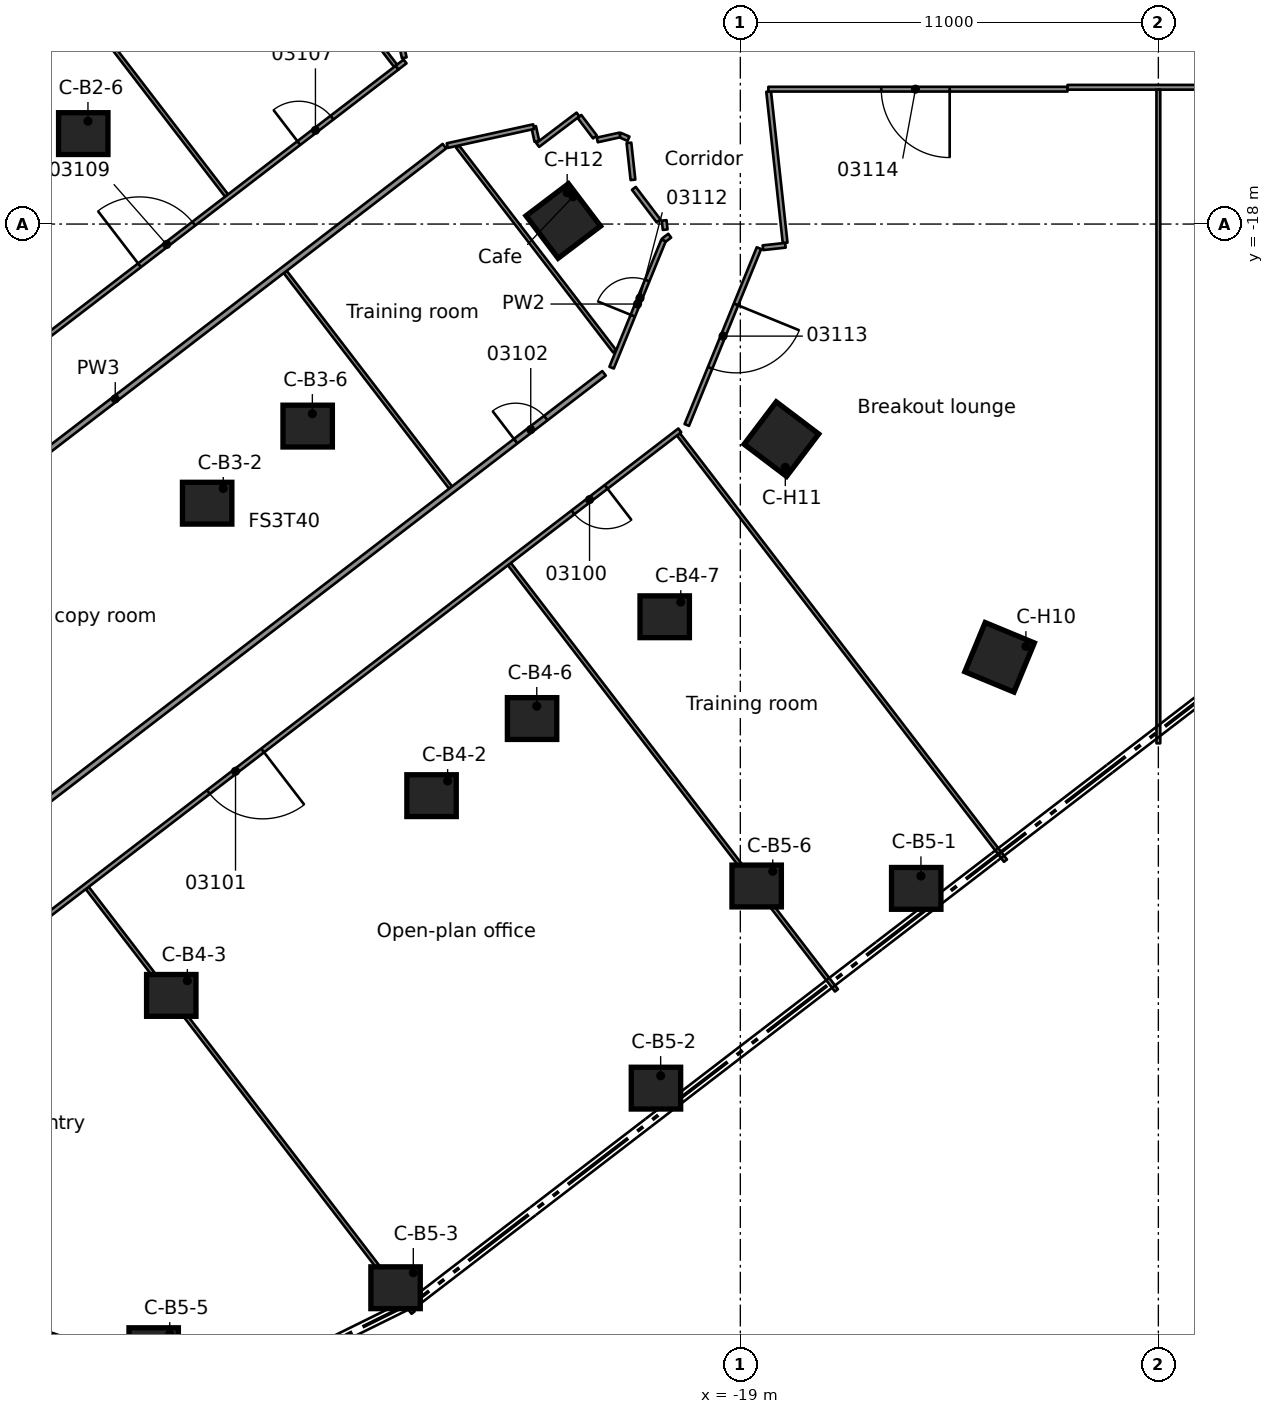
"""IFC4 building model, lengths in metres.
Left out: names, types, materials, properties, quantities, classifications, styles, units other than length and angle.
Written with IfcOpenShell. Run it as: python <this file> out.ifc"""

import sys

from ifc_helpers import new_model, si_unit, direction, frame, frame_2d, origin, origin_2d, place, context, subcontext, project, spatial, rectangle, extrude, element, fill, save


model = new_model("IFC4")
c1 = context("Model", 3, precision=1e-05, world=origin(), true_north=direction((0.0, 1.0)))
c2 = subcontext(c1, "Body", "Model", "MODEL_VIEW")
j1 = project(units=[si_unit("LENGTHUNIT", "METRE"), si_unit("PLANEANGLEUNIT", "RADIAN")], contexts=[c1])
p1 = place(None, origin())
s1 = spatial("IfcSite", under=j1, at=p1, CompositionType="ELEMENT")
p2 = place(p1, origin())
s2 = spatial("IfcBuilding", under=s1, at=p2, CompositionType="ELEMENT")
p3 = place(p2, frame((0.0, 0.0, 15.5)))
s3 = spatial("IfcBuildingStorey", under=s2, at=p3, CompositionType="ELEMENT", Elevation=15.5)
for number, where, z_axis, x_axis in (
    (1, (-36.29, -15.62, 0.0), (0.0, 0.0, 1.0), (1.0, 0.0, 0.0)),
    (2, (-33.03, -25.345, 0.0), (0.0, 0.0, 1.0), (1.0, 0.0, 0.0)),
    (3, (-30.385, -23.316, 0.0), (0.0, 0.0, 1.0), (1.0, 0.0, 0.0)),
    (4, (-27.125, -33.04, 0.0), (0.0, 0.0, 1.0), (1.0, 0.0, 0.0)),
    (5, (-33.974, -38.296, 0.0), (0.0, 0.0, 1.0), (1.0, 0.0, 0.0)),
    (6, (-24.48, -31.011, 0.0), (0.0, 0.0, 1.0), (1.0, 0.0, 0.0)),
    (7, (-20.99, -28.333, 0.0), (0.0, 0.0, 1.0), (1.0, 0.0, 0.0)),
    (8, (-14.371, -35.48, 0.0), (0.0, 0.0, 1.0), (1.0, 0.0, 0.0)),
    (9, (-21.22, -40.736, 0.0), (0.0, 0.0, 1.0), (1.0, 0.0, 0.0)),
    (10, (-28.072, -45.988, 0.0), (0.0, 0.0, 1.0), (1.0, 0.0, 0.0)),
    (11, (-34.437, -47.592, 0.0), (0.0, 0.0, 1.0), (1.0, 0.0, 0.0)),
    (12, (-18.57, -35.417, 0.0), (0.0, 0.0, 1.0), (1.0, 0.0, 0.0)),
):
    element("IfcColumn", number, at=place(p3, frame(where, z_axis=z_axis, x_axis=x_axis)), inside=s3, PredefinedType="COLUMN", context=c2, shape_type="SweptSolid", body=[
        extrude(rectangle(XDim=1.3, YDim=1.1, at=origin_2d()), origin(), (0.0, 0.0, 1.0), 5.0),
    ])
for number, where, z_axis, x_axis in (
    (13, (-12.178, -29.4, 0.0), (0.0, 0.0, 1.0), (-0.383, -0.924, 0.0)),
    (14, (-17.919, -23.659, 0.0), (0.0, 0.0, 1.0), (-0.604, -0.797, 0.0)),
    (15, (-23.659, -17.919, 0.0), (0.0, 0.0, 1.0), (-0.797, -0.604, 0.0)),
):
    element("IfcColumn", number, at=place(p3, frame(where, z_axis=z_axis, x_axis=x_axis)), inside=s3, PredefinedType="COLUMN", context=c2, shape_type="SweptSolid", body=[
        extrude(rectangle(XDim=1.4, YDim=1.4, at=origin_2d()), origin(), (0.0, 0.0, 1.0), 5.0),
    ])
p4 = place(p3, frame((-21.004, -17.904, 0.0), z_axis=(0.0, 0.0, 1.0), x_axis=(0.105933230141, -0.994373245191, 0.0)))
e16 = element("IfcWall", 16, at=p4, inside=s3, PredefinedType="PARTITIONING", context=c2, shape_type="SweptSolid", body=[
    extrude(rectangle(XDim=0.244, YDim=0.125, at=frame_2d((0.122, 0.0))), origin(), (0.0, 0.0, 1.0), 4.58),
])
p5 = place(p3, frame((-21.931, -15.864, 0.0), z_axis=(0.0, 0.0, 1.0), x_axis=(0.10837572028, -0.99411000561, 0.0)))
e17 = element("IfcWall", 17, at=p5, inside=s3, PredefinedType="PARTITIONING", context=c2, shape_type="SweptSolid", body=[
    extrude(rectangle(XDim=0.978, YDim=0.125, at=frame_2d((0.489, 0.0))), origin(), (0.0, 0.0, 1.0), 4.58),
])
p6 = place(p3, frame((-18.255, -14.513, 0.0), z_axis=(0.0, 0.0, 1.0), x_axis=(0.108304050005, -0.994117816334, 0.0)))
e18 = element("IfcWall", 18, at=p6, inside=s3, PredefinedType="PARTITIONING", context=c2, shape_type="SweptSolid", body=[
    extrude(rectangle(XDim=4.006, YDim=0.125, at=frame_2d((2.003, 0.0))), origin(), (0.0, 0.0, 1.0), 4.58),
])
p7 = place(p3, frame((-24.438, -15.437, 0.0), z_axis=(0.0, 0.0, 1.0), x_axis=(0.212096867325, -0.977248647413, 0.0)))
e19 = element("IfcWall", 19, at=p7, inside=s3, PredefinedType="PARTITIONING", context=c2, shape_type="SweptSolid", body=[
    extrude(rectangle(XDim=0.396, YDim=0.125, at=frame_2d((0.198, 0.0))), origin(), (0.0, 0.0, 1.0), 4.58),
])
p8 = place(p3, frame((-27.959, -13.1, 0.0), z_axis=(0.0, 0.0, 1.0), x_axis=(0.215346078447, -0.976537795734, 0.0)))
e20 = element("IfcWall", 20, at=p8, inside=s3, PredefinedType="PARTITIONING", context=c2, shape_type="SweptSolid", body=[
    extrude(rectangle(XDim=0.539, YDim=0.125, at=frame_2d((0.269, 0.0))), origin(), (0.0, 0.0, 1.0), 4.58),
])
p9 = place(p3, frame((-23.234, -15.168, 0.0), z_axis=(0.0, 0.0, 1.0), x_axis=(0.602990949897, -0.797748026849, 0.0)))
e21 = element("IfcWall", 21, at=p9, inside=s3, PredefinedType="PARTITIONING", context=c2, shape_type="SweptSolid", body=[
    extrude(rectangle(XDim=0.678, YDim=0.125, at=frame_2d((0.339, 0.0))), origin(), (0.0, 0.0, 1.0), 4.58),
])
p10 = place(p3, frame((-21.801, -17.061, 0.0), z_axis=(0.0, 0.0, 1.0), x_axis=(0.604123687543, -0.796890563471, 0.0)))
e22 = element("IfcWall", 22, at=p10, inside=s3, PredefinedType="PARTITIONING", context=c2, shape_type="SweptSolid", body=[
    extrude(rectangle(XDim=1.078, YDim=0.125, at=frame_2d((0.539, 0.0))), origin(), (0.0, 0.0, 1.0), 4.58),
])
p11 = place(p3, frame((-36.185, -35.471, 0.0), z_axis=(0.0, 0.0, 1.0), x_axis=(0.608776156658, -0.793342039152, 0.0)))
e23 = element("IfcWall", 23, at=p11, inside=s3, PredefinedType="PARTITIONING", context=c2, shape_type="SweptSolid", body=[
    extrude(rectangle(XDim=14.082, YDim=0.1, at=frame_2d((7.041, 0.0))), origin(), (0.0, 0.0, 1.0), 4.58),
])
p12 = place(p3, frame((-41.126, -6.033, 0.0), z_axis=(0.0, 0.0, 1.0), x_axis=(0.608775561638, -0.793342495743, 0.0)))
e24 = element("IfcWall", 24, at=p12, inside=s3, PredefinedType="PARTITIONING", context=c2, shape_type="SweptSolid", body=[
    extrude(rectangle(XDim=14.136, YDim=0.1, at=frame_2d((7.068, 0.0))), origin(), (0.0, 0.0, 1.0), 4.58),
])
p13 = place(p3, frame((-30.975, -19.261, 0.0), z_axis=(0.0, 0.0, 1.0), x_axis=(0.608667353297, -0.793425518263, 0.0)))
e25 = element("IfcWall", 25, at=p13, inside=s3, PredefinedType="PARTITIONING", context=c2, shape_type="SweptSolid", body=[
    extrude(rectangle(XDim=7.15, YDim=0.1, at=frame_2d((3.575, 0.0))), origin(), (0.0, 0.0, 1.0), 4.58),
])
p14 = place(p3, frame((-25.077, -26.948, 0.0), z_axis=(0.0, 0.0, 1.0), x_axis=(0.60874219909, -0.793368095557, 0.0)))
e26 = element("IfcWall", 26, at=p14, inside=s3, PredefinedType="PARTITIONING", context=c2, shape_type="SweptSolid", body=[
    extrude(rectangle(XDim=14.137, YDim=0.1, at=frame_2d((7.069, 0.0))), origin(), (0.0, 0.0, 1.0), 4.58),
])
p15 = place(p3, frame((-36.678, -2.62, 0.0), z_axis=(0.0, 0.0, 1.0), x_axis=(0.608783902678, -0.793336095132, 0.0)))
e27 = element("IfcWall", 27, at=p15, inside=s3, PredefinedType="PARTITIONING", context=c2, shape_type="SweptSolid", body=[
    extrude(rectangle(XDim=14.136, YDim=0.1, at=frame_2d((7.068, 0.0))), origin(), (0.0, 0.0, 1.0), 4.58),
])
p16 = place(p3, frame((-26.44, -15.962, 0.0), z_axis=(0.0, 0.0, 1.0), x_axis=(0.608697215762, -0.79340260872, 0.0)))
e28 = element("IfcWall", 28, at=p16, inside=s3, PredefinedType="PARTITIONING", context=c2, shape_type="SweptSolid", body=[
    extrude(rectangle(XDim=6.79, YDim=0.1, at=frame_2d((3.395, 0.0))), origin(), (0.0, 0.0, 1.0), 4.58),
])
p17 = place(p3, frame((-20.63, -23.535, 0.0), z_axis=(0.0, 0.0, 1.0), x_axis=(0.608785675767, -0.79333473451, 0.0)))
e29 = element("IfcWall", 29, at=p17, inside=s3, PredefinedType="PARTITIONING", context=c2, shape_type="SweptSolid", body=[
    extrude(rectangle(XDim=14.138, YDim=0.1, at=frame_2d((7.069, 0.0))), origin(), (0.0, 0.0, 1.0), 4.58),
])
p18 = place(p3, frame((-22.17, -15.656, 0.0), z_axis=(0.0, 0.0, 1.0), x_axis=(0.914864311429, -0.403761429156, 0.0)))
e30 = element("IfcWall", 30, at=p18, inside=s3, PredefinedType="PARTITIONING", context=c2, shape_type="SweptSolid", body=[
    extrude(rectangle(XDim=0.248, YDim=0.125, at=frame_2d((0.124, 0.0))), origin(), (0.0, 0.0, 1.0), 4.58),
])
p19 = place(p3, frame((-10.391, -14.451, 0.0), z_axis=(0.0, 0.0, 1.0), x_axis=(-1.0, 0.0, 0.0)))
e31 = element("IfcWall", 31, at=p19, inside=s3, PredefinedType="PARTITIONING", context=c2, shape_type="SweptSolid", body=[
    extrude(rectangle(XDim=7.871, YDim=0.125, at=frame_2d((3.936, 0.0))), origin(), (0.0, 0.0, 1.0), 4.58),
])
p20 = place(p19, frame((3.1, 0.0, 0.0)))
e32 = element("IfcOpeningElement", 32, at=p20, cuts=e31, PredefinedType="OPENING", context=c2, shape_type="SweptSolid", body=[
    extrude(rectangle(XDim=1.8, YDim=2.1, at=frame_2d((0.9, 1.05))), frame((0.0, 0.073, 0.0), z_axis=(0.0, -1.0, 0.0), x_axis=(1.0, 0.0, 0.0)), (0.0, 0.0, 1.0), 0.145),
])
p21 = place(p3, frame((10.391, -14.401, 0.0), z_axis=(0.0, 0.0, 1.0), x_axis=(-1.0, 0.0, 0.0)))
e33 = element("IfcWall", 33, at=p21, inside=s3, PredefinedType="PARTITIONING", context=c2, shape_type="SweptSolid", body=[
    extrude(rectangle(XDim=20.781, YDim=0.125, at=frame_2d((10.391, 0.0))), origin(), (0.0, 0.0, 1.0), 4.58),
])
p22 = place(p21, frame((13.991, 0.0, 0.0)))
e34 = element("IfcOpeningElement", 34, at=p22, cuts=e33, PredefinedType="OPENING", context=c2, shape_type="SweptSolid", body=[
    extrude(rectangle(XDim=0.9, YDim=2.1, at=frame_2d((0.45, 1.05))), frame((0.0, 0.073, 0.0), z_axis=(0.0, -1.0, 0.0), x_axis=(1.0, 0.0, 0.0)), (0.0, 0.0, 1.0), 0.145),
])
p23 = place(p21, frame((5.991, 0.0, 0.0)))
e35 = element("IfcOpeningElement", 35, at=p23, cuts=e33, PredefinedType="OPENING", context=c2, shape_type="SweptSolid", body=[
    extrude(rectangle(XDim=0.9, YDim=2.1, at=frame_2d((0.45, 1.05))), frame((0.0, 0.073, 0.0), z_axis=(0.0, -1.0, 0.0), x_axis=(1.0, 0.0, 0.0)), (0.0, 0.0, 1.0), 0.145),
])
p24 = place(p3, frame((-18.406, -18.623, 0.0), z_axis=(0.0, 0.0, 1.0), x_axis=(0.994037722998, 0.109036715182, 0.0)))
e36 = element("IfcWall", 36, at=p24, inside=s3, PredefinedType="PARTITIONING", context=c2, shape_type="SweptSolid", body=[
    extrude(rectangle(XDim=0.596, YDim=0.125, at=frame_2d((0.298, 0.0))), origin(), (0.0, 0.0, 1.0), 4.58),
])
p25 = place(p3, frame((-26.712, -15.936, 0.0), z_axis=(0.0, 0.0, 1.0), x_axis=(0.976756126143, 0.214353609817, 0.0)))
e37 = element("IfcWall", 37, at=p25, inside=s3, PredefinedType="PARTITIONING", context=c2, shape_type="SweptSolid", body=[
    extrude(rectangle(XDim=2.328, YDim=0.125, at=frame_2d((1.164, 0.0))), origin(), (0.0, 0.0, 1.0), 4.58),
])
p26 = place(p3, frame((-22.765, -15.787, 0.0), z_axis=(0.0, 0.0, 1.0), x_axis=(0.97657209397, 0.215190486033, 0.0)))
e38 = element("IfcWall", 38, at=p26, inside=s3, PredefinedType="PARTITIONING", context=c2, shape_type="SweptSolid", body=[
    extrude(rectangle(XDim=0.609, YDim=0.125, at=frame_2d((0.305, 0.0))), origin(), (0.0, 0.0, 1.0), 4.58),
])
p27 = place(p3, frame((-24.332, -15.92, 0.0), z_axis=(0.0, 0.0, 1.0), x_axis=(0.797480426333, 0.603344818172, 0.0)))
e39 = element("IfcWall", 39, at=p27, inside=s3, PredefinedType="PARTITIONING", context=c2, shape_type="SweptSolid", body=[
    extrude(rectangle(XDim=1.329, YDim=0.125, at=frame_2d((0.665, 0.0))), origin(), (0.0, 0.0, 1.0), 4.58),
])
p28 = place(p3, frame((-21.019, -18.428, 0.0), z_axis=(0.0, 0.0, 1.0), x_axis=(0.797092148154, 0.603857687995, 0.0)))
e40 = element("IfcWall", 40, at=p28, inside=s3, PredefinedType="PARTITIONING", context=c2, shape_type="SweptSolid", body=[
    extrude(rectangle(XDim=0.202, YDim=0.125, at=frame_2d((0.101, 0.0))), origin(), (0.0, 0.0, 1.0), 4.58),
])
p29 = place(p3, frame((-20.593, -23.429, 0.0), z_axis=(0.0, 0.0, 1.0), x_axis=(-0.793381896857, -0.60872421156, 0.0)))
e41 = element("IfcWall", 41, at=p29, inside=s3, PredefinedType="PARTITIONING", context=c2, shape_type="SweptSolid", body=[
    extrude(rectangle(XDim=24.9, YDim=0.125, at=frame_2d((12.45, 0.0))), origin(), (0.0, 0.0, 1.0), 4.58),
])
p30 = place(p29, frame((2.444, 0.0, 0.0)))
e42 = element("IfcOpeningElement", 42, at=p30, cuts=e41, PredefinedType="OPENING", context=c2, shape_type="SweptSolid", body=[
    extrude(rectangle(XDim=1.1, YDim=2.1, at=frame_2d((0.55, 1.05))), frame((0.0, 0.073, 0.0), z_axis=(0.0, -1.0, 0.0), x_axis=(1.0, 0.0, 0.0)), (0.0, 0.0, 1.0), 0.145),
])
p31 = place(p29, frame((13.835, 0.0, 0.0)))
e43 = element("IfcOpeningElement", 43, at=p31, cuts=e41, PredefinedType="OPENING", context=c2, shape_type="SweptSolid", body=[
    extrude(rectangle(XDim=1.8, YDim=2.1, at=frame_2d((0.9, 1.05))), frame((0.0, 0.073, 0.0), z_axis=(0.0, -1.0, 0.0), x_axis=(1.0, 0.0, 0.0)), (0.0, 0.0, 1.0), 0.145),
])
p32 = place(p3, frame((-39.667, -35.038, 0.0), z_axis=(0.0, 0.0, 1.0), x_axis=(0.793278123289, 0.608859441177, 0.0)))
e44 = element("IfcWall", 44, at=p32, inside=s3, PredefinedType="PARTITIONING", context=c2, shape_type="SweptSolid", body=[
    extrude(rectangle(XDim=21.532, YDim=0.15, at=frame_2d((10.766, 0.0))), origin(), (0.0, 0.0, 1.0), 4.58),
])
p33 = place(p32, frame((18.6, 0.0, 0.0)))
e45 = element("IfcOpeningElement", 45, at=p33, cuts=e44, PredefinedType="OPENING", context=c2, shape_type="SweptSolid", body=[
    extrude(rectangle(XDim=1.0, YDim=2.1, at=frame_2d((0.5, 1.05))), frame((0.0, 0.085, 0.0), z_axis=(0.0, -1.0, 0.0), x_axis=(1.0, 0.0, 0.0)), (0.0, 0.0, 1.0), 0.17),
])
p34 = place(p32, frame((0.85, 0.0, 0.0)))
e46 = element("IfcOpeningElement", 46, at=p34, cuts=e44, PredefinedType="OPENING", context=c2, shape_type="SweptSolid", body=[
    extrude(rectangle(XDim=0.9, YDim=2.1, at=frame_2d((0.45, 1.05))), frame((0.0, 0.085, 0.0), z_axis=(0.0, -1.0, 0.0), x_axis=(1.0, 0.0, 0.0)), (0.0, 0.0, 1.0), 0.17),
])
p35 = place(p3, frame((-26.787, -15.951, 0.0), z_axis=(0.0, 0.0, 1.0), x_axis=(-0.793270647626, -0.608869181035, 0.0)))
e47 = element("IfcWall", 47, at=p35, inside=s3, PredefinedType="PARTITIONING", context=c2, shape_type="SweptSolid", body=[
    extrude(rectangle(XDim=21.837, YDim=0.15, at=frame_2d((10.919, 0.0))), origin(), (0.0, 0.0, 1.0), 4.58),
])
p36 = place(p35, frame((13.973, 0.0, 0.0)))
e48 = element("IfcOpeningElement", 48, at=p36, cuts=e47, PredefinedType="OPENING", context=c2, shape_type="SweptSolid", body=[
    extrude(rectangle(XDim=0.9, YDim=2.1, at=frame_2d((0.45, 1.05))), frame((0.0, 0.085, 0.0), z_axis=(0.0, -1.0, 0.0), x_axis=(1.0, 0.0, 0.0)), (0.0, 0.0, 1.0), 0.17),
])
p37 = place(p3, frame((-47.476, -28.803, 0.0), z_axis=(0.0, 0.0, 1.0), x_axis=(0.793397382488, 0.608704027801, 0.0)))
e49 = element("IfcWall", 49, at=p37, inside=s3, PredefinedType="PARTITIONING", context=c2, shape_type="SweptSolid", body=[
    extrude(rectangle(XDim=24.506, YDim=0.125, at=frame_2d((12.253, 0.0))), origin(), (0.0, 0.0, 1.0), 4.58),
])
p38 = place(p37, frame((21.249, 0.0, 0.0)))
e50 = element("IfcOpeningElement", 50, at=p38, cuts=e49, PredefinedType="OPENING", context=c2, shape_type="SweptSolid", body=[
    extrude(rectangle(XDim=1.1, YDim=2.1, at=frame_2d((0.55, 1.05))), frame((0.0, 0.073, 0.0), z_axis=(0.0, -1.0, 0.0), x_axis=(1.0, 0.0, 0.0)), (0.0, 0.0, 1.0), 0.145),
])
p39 = place(p37, frame((8.75, 0.0, 0.0)))
e51 = element("IfcOpeningElement", 51, at=p39, cuts=e49, PredefinedType="OPENING", context=c2, shape_type="SweptSolid", body=[
    extrude(rectangle(XDim=1.8, YDim=2.1, at=frame_2d((0.9, 1.05))), frame((0.0, 0.073, 0.0), z_axis=(0.0, -1.0, 0.0), x_axis=(1.0, 0.0, 0.0)), (0.0, 0.0, 1.0), 0.145),
])
p40 = place(p37, frame((15.965, 0.0, 0.0)))
e52 = element("IfcOpeningElement", 52, at=p40, cuts=e49, PredefinedType="OPENING", context=c2, shape_type="SweptSolid", body=[
    extrude(rectangle(XDim=1.8, YDim=2.1, at=frame_2d((0.9, 1.05))), frame((0.0, 0.073, 0.0), z_axis=(0.0, -1.0, 0.0), x_axis=(1.0, 0.0, 0.0)), (0.0, 0.0, 1.0), 0.145),
])
p41 = place(p3, frame((-28.034, -13.885, 0.0), z_axis=(0.0, 0.0, 1.0), x_axis=(0.792488206653, 0.609887237378, 0.0)))
e53 = element("IfcWall", 53, at=p41, inside=s3, PredefinedType="PARTITIONING", context=c2, shape_type="SweptSolid", body=[
    extrude(rectangle(XDim=0.267, YDim=0.125, at=frame_2d((0.134, 0.0))), origin(), (0.0, 0.0, 1.0), 4.58),
])
p42 = place(p3, frame((-18.51, -18.634, 0.0), z_axis=(0.0, 0.0, 1.0), x_axis=(-0.377847706778, -0.925867760797, 0.0)))
e54 = element("IfcWall", 54, at=p42, inside=s3, PredefinedType="PARTITIONING", context=c2, shape_type="SweptSolid", body=[
    extrude(rectangle(XDim=5.026, YDim=0.125, at=frame_2d((2.513, 0.0))), origin(), (0.0, 0.0, 1.0), 4.58),
])
p43 = place(p42, frame((1.6, 0.0, 0.0)))
e55 = element("IfcOpeningElement", 55, at=p43, cuts=e54, PredefinedType="OPENING", context=c2, shape_type="SweptSolid", body=[
    extrude(rectangle(XDim=1.8, YDim=2.1, at=frame_2d((0.9, 1.05))), frame((0.0, 0.073, 0.0), z_axis=(0.0, -1.0, 0.0), x_axis=(1.0, 0.0, 0.0)), (0.0, 0.0, 1.0), 0.145),
])
p44 = place(p3, frame((-22.387, -21.778, 0.0), z_axis=(0.0, 0.0, 1.0), x_axis=(0.377843834017, 0.925869341265, 0.0)))
e56 = element("IfcWall", 56, at=p44, inside=s3, PredefinedType="PARTITIONING", context=c2, shape_type="SweptSolid", body=[
    extrude(rectangle(XDim=3.615, YDim=0.125, at=frame_2d((1.808, 0.0))), origin(), (0.0, 0.0, 1.0), 4.58),
])
p45 = place(p44, frame((1.476, 0.0, 0.0)))
e57 = element("IfcOpeningElement", 57, at=p45, cuts=e56, PredefinedType="OPENING", context=c2, shape_type="SweptSolid", body=[
    extrude(rectangle(XDim=1.0, YDim=2.1, at=frame_2d((0.5, 1.05))), frame((0.0, 0.073, 0.0), z_axis=(0.0, -1.0, 0.0), x_axis=(1.0, 0.0, 0.0)), (0.0, 0.0, 1.0), 0.145),
])
p46 = place(p3, frame((-8.0, -31.663, 0.0), z_axis=(0.0, 0.0, 1.0), x_axis=(0.0, 1.0, 0.0)))
e58 = element("IfcWall", 58, at=p46, inside=s3, PredefinedType="PARTITIONING", context=c2, shape_type="SweptSolid", body=[
    extrude(rectangle(XDim=17.2, YDim=0.1, at=frame_2d((8.6, 0.0))), origin(), (0.0, 0.0, 1.0), 4.58),
])
p47 = place(p30, origin())
e59 = element("IfcDoor", 59, at=p47, inside=s3, OperationType="SINGLE_SWING_LEFT", PredefinedType="DOOR", context=c2, shape_type="SweptSolid", body=[
    extrude(rectangle(XDim=1.1, YDim=2.1, at=frame_2d((0.55, 1.05))), frame((0.0, 0.025, 0.0), z_axis=(0.0, -1.0, 0.0), x_axis=(1.0, 0.0, 0.0)), (0.0, 0.0, 1.0), 0.05),
])
fill(e42, e59)
p48 = place(p31, origin())
e60 = element("IfcDoor", 60, at=p48, inside=s3, OperationType="DOUBLE_DOOR_SINGLE_SWING", PredefinedType="DOOR", context=c2, shape_type="SweptSolid", body=[
    extrude(rectangle(XDim=1.8, YDim=2.1, at=frame_2d((0.9, 1.05))), frame((0.0, 0.025, 0.0), z_axis=(0.0, -1.0, 0.0), x_axis=(1.0, 0.0, 0.0)), (0.0, 0.0, 1.0), 0.05),
])
fill(e43, e60)
p49 = place(p33, origin())
e61 = element("IfcDoor", 61, at=p49, inside=s3, OperationType="SINGLE_SWING_RIGHT", PredefinedType="DOOR", context=c2, shape_type="SweptSolid", body=[
    extrude(rectangle(XDim=1.0, YDim=2.1, at=frame_2d((0.5, 1.05))), frame((0.0, 0.025, 0.0), z_axis=(0.0, -1.0, 0.0), x_axis=(1.0, 0.0, 0.0)), (0.0, 0.0, 1.0), 0.05),
])
fill(e45, e61)
p50 = place(p38, origin())
e62 = element("IfcDoor", 62, at=p50, inside=s3, OperationType="SINGLE_SWING_RIGHT", PredefinedType="DOOR", context=c2, shape_type="SweptSolid", body=[
    extrude(rectangle(XDim=1.1, YDim=2.1, at=frame_2d((0.55, 1.05))), frame((0.0, 0.025, 0.0), z_axis=(0.0, -1.0, 0.0), x_axis=(1.0, 0.0, 0.0)), (0.0, 0.0, 1.0), 0.05),
])
fill(e50, e62)
p51 = place(p40, origin())
e63 = element("IfcDoor", 63, at=p51, inside=s3, OperationType="DOUBLE_DOOR_SINGLE_SWING", PredefinedType="DOOR", context=c2, shape_type="SweptSolid", body=[
    extrude(rectangle(XDim=1.8, YDim=2.1, at=frame_2d((0.9, 1.05))), frame((0.0, 0.025, 0.0), z_axis=(0.0, -1.0, 0.0), x_axis=(1.0, 0.0, 0.0)), (0.0, 0.0, 1.0), 0.05),
])
fill(e52, e63)
p52 = place(p45, origin())
e64 = element("IfcDoor", 64, at=p52, inside=s3, OperationType="SINGLE_SWING_RIGHT", PredefinedType="DOOR", context=c2, shape_type="SweptSolid", body=[
    extrude(rectangle(XDim=1.0, YDim=2.1, at=frame_2d((0.5, 1.05))), frame((0.0, 0.025, 0.0), z_axis=(0.0, -1.0, 0.0), x_axis=(1.0, 0.0, 0.0)), (0.0, 0.0, 1.0), 0.05),
])
fill(e57, e64)
p53 = place(p43, origin())
e65 = element("IfcDoor", 65, at=p53, inside=s3, OperationType="DOUBLE_DOOR_SINGLE_SWING", PredefinedType="DOOR", context=c2, shape_type="SweptSolid", body=[
    extrude(rectangle(XDim=1.8, YDim=2.1, at=frame_2d((0.9, 1.05))), frame((0.0, 0.025, 0.0), z_axis=(0.0, -1.0, 0.0), x_axis=(1.0, 0.0, 0.0)), (0.0, 0.0, 1.0), 0.05),
])
fill(e55, e65)
p54 = place(p20, origin())
e66 = element("IfcDoor", 66, at=p54, inside=s3, OperationType="DOUBLE_DOOR_SINGLE_SWING", PredefinedType="DOOR", context=c2, shape_type="SweptSolid", body=[
    extrude(rectangle(XDim=1.8, YDim=2.1, at=frame_2d((0.9, 1.05))), frame((0.0, 0.025, 0.0), z_axis=(0.0, -1.0, 0.0), x_axis=(1.0, 0.0, 0.0)), (0.0, 0.0, 1.0), 0.05),
])
fill(e32, e66)
save(model, sys.argv[1])
